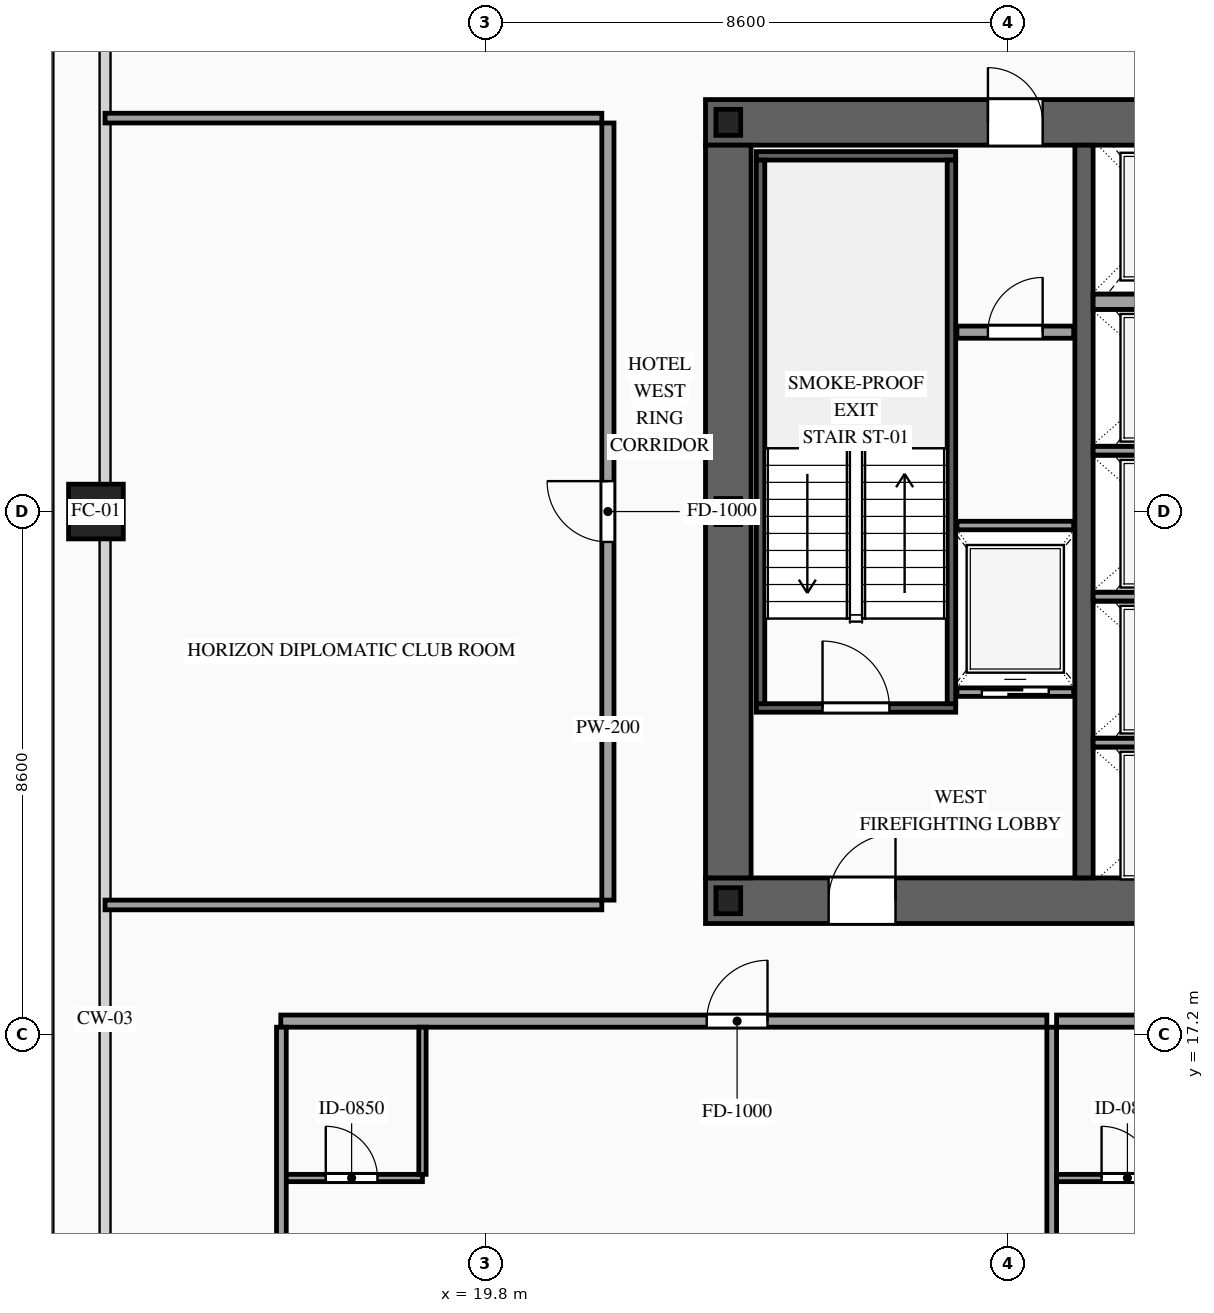
"""IFC4 building model, lengths in metres.
Left out: names, types, materials, properties, quantities, classifications, styles, units other than length and angle.
Written with IfcOpenShell. Run it as: python <this file> out.ifc"""

import sys

from ifc_helpers import new_model, si_unit, direction, frame, frame_2d, origin, origin_2d, place, context, subcontext, project, spatial, rectangle, hollow_rectangle, i_section, extrude, source, transform, mapped, element, fill, save


model = new_model("IFC4")
c1 = context("Model", 3, precision=1e-05, world=origin(), true_north=direction((0.0, 1.0)))
c2 = subcontext(c1, "Body", "Model", "MODEL_VIEW")
j1 = project(units=[si_unit("LENGTHUNIT", "METRE"), si_unit("PLANEANGLEUNIT", "RADIAN")], contexts=[c1])
p1 = place(None, origin())
s1 = spatial("IfcSite", under=j1, at=p1, CompositionType="ELEMENT")
p2 = place(p1, origin())
s2 = spatial("IfcBuilding", under=s1, at=p2, CompositionType="ELEMENT")
p3 = place(p2, frame((0.0, 0.0, 101.0)))
s3 = spatial("IfcBuildingStorey", under=s2, at=p3, CompositionType="ELEMENT", Elevation=101.0)
p4 = place(p3, frame((23.425, 19.4, 0.0), z_axis=(0.0, 0.0, 1.0), x_axis=(1.0, 0.0, 0.0)))
e1 = element("IfcWall", 1, at=p4, inside=s3, PredefinedType="SHEAR", context=c2, shape_type="SweptSolid", body=[
    extrude(rectangle(XDim=27.15, YDim=0.75, at=frame_2d((13.575, 0.0))), origin(), (0.0, 0.0, 1.0), 3.6),
])
p5 = place(p4, frame((2.025, 0.0, 0.0)))
e2 = element("IfcOpeningElement", 2, at=p5, cuts=e1, PredefinedType="OPENING", context=c2, shape_type="SweptSolid", body=[
    extrude(rectangle(XDim=1.1, YDim=2.2, at=frame_2d((0.55, 1.1))), frame((0.0, 0.39, 0.0), z_axis=(0.0, -1.0, 0.0), x_axis=(1.0, 0.0, 0.0)), (0.0, 0.0, 1.0), 0.78),
])
p6 = place(p4, frame((9.925, 0.0, 0.0)))
e3 = element("IfcOpeningElement", 3, at=p6, cuts=e1, PredefinedType="OPENING", context=c2, shape_type="SweptSolid", body=[
    extrude(rectangle(XDim=1.1, YDim=2.2, at=frame_2d((0.55, 1.1))), frame((0.0, 0.39, 0.0), z_axis=(0.0, -1.0, 0.0), x_axis=(1.0, 0.0, 0.0)), (0.0, 0.0, 1.0), 0.78),
])
p7 = place(p4, frame((23.125, 0.0, 0.0)))
e4 = element("IfcOpeningElement", 4, at=p7, cuts=e1, PredefinedType="OPENING", context=c2, shape_type="SweptSolid", body=[
    extrude(rectangle(XDim=1.1, YDim=2.2, at=frame_2d((0.55, 1.1))), frame((0.0, 0.39, 0.0), z_axis=(0.0, -1.0, 0.0), x_axis=(1.0, 0.0, 0.0)), (0.0, 0.0, 1.0), 0.78),
])
p8 = place(p4, frame((19.745, 0.0, 0.0)))
e5 = element("IfcOpeningElement", 5, at=p8, cuts=e1, PredefinedType="OPENING", context=c2, shape_type="SweptSolid", body=[
    extrude(rectangle(XDim=0.9, YDim=2.15, at=frame_2d((0.45, 1.075))), frame((0.0, 0.39, 0.0), z_axis=(0.0, -1.0, 0.0), x_axis=(1.0, 0.0, 0.0)), (0.0, 0.0, 1.0), 0.78),
])
p9 = place(p4, frame((18.305, 0.0, 0.0)))
e6 = element("IfcOpeningElement", 6, at=p9, cuts=e1, PredefinedType="OPENING", context=c2, shape_type="SweptSolid", body=[
    extrude(rectangle(XDim=0.9, YDim=2.15, at=frame_2d((0.45, 1.075))), frame((0.0, 0.39, 0.0), z_axis=(0.0, -1.0, 0.0), x_axis=(1.0, 0.0, 0.0)), (0.0, 0.0, 1.0), 0.78),
])
p10 = place(p3, frame((23.425, 32.2, 0.0), z_axis=(0.0, 0.0, 1.0), x_axis=(1.0, 0.0, 0.0)))
e7 = element("IfcWall", 7, at=p10, inside=s3, PredefinedType="SHEAR", context=c2, shape_type="SweptSolid", body=[
    extrude(rectangle(XDim=27.15, YDim=0.75, at=frame_2d((13.575, 0.0))), origin(), (0.0, 0.0, 1.0), 3.6),
])
p11 = place(p10, frame((4.645, 0.0, 0.0)))
e8 = element("IfcOpeningElement", 8, at=p11, cuts=e7, PredefinedType="OPENING", context=c2, shape_type="SweptSolid", body=[
    extrude(rectangle(XDim=0.9, YDim=2.15, at=frame_2d((0.45, 1.075))), frame((0.0, 0.39, 0.0), z_axis=(0.0, -1.0, 0.0), x_axis=(1.0, 0.0, 0.0)), (0.0, 0.0, 1.0), 0.78),
])
p12 = place(p10, frame((9.925, 0.0, 0.0)))
e9 = element("IfcOpeningElement", 9, at=p12, cuts=e7, PredefinedType="OPENING", context=c2, shape_type="SweptSolid", body=[
    extrude(rectangle(XDim=1.1, YDim=2.2, at=frame_2d((0.55, 1.1))), frame((0.0, 0.39, 0.0), z_axis=(0.0, -1.0, 0.0), x_axis=(1.0, 0.0, 0.0)), (0.0, 0.0, 1.0), 0.78),
])
p13 = place(p10, frame((15.775, 0.0, 0.0)))
e10 = element("IfcOpeningElement", 10, at=p13, cuts=e7, PredefinedType="OPENING", context=c2, shape_type="SweptSolid", body=[
    extrude(rectangle(XDim=1.1, YDim=2.2, at=frame_2d((0.55, 1.1))), frame((0.0, 0.39, 0.0), z_axis=(0.0, -1.0, 0.0), x_axis=(1.0, 0.0, 0.0)), (0.0, 0.0, 1.0), 0.78),
])
p14 = place(p10, frame((19.745, 0.0, 0.0)))
e11 = element("IfcOpeningElement", 11, at=p14, cuts=e7, PredefinedType="OPENING", context=c2, shape_type="SweptSolid", body=[
    extrude(rectangle(XDim=0.9, YDim=2.15, at=frame_2d((0.45, 1.075))), frame((0.0, 0.39, 0.0), z_axis=(0.0, -1.0, 0.0), x_axis=(1.0, 0.0, 0.0)), (0.0, 0.0, 1.0), 0.78),
])
m1 = source(origin(), c2, "Body", "SweptSolid", [
    extrude(rectangle(XDim=12.05, YDim=0.75, at=frame_2d((6.025, 0.0))), origin(), (0.0, 0.0, 1.0), 3.6),
])
p15 = place(p3, frame((23.8, 19.775, 0.0), z_axis=(0.0, 0.0, 1.0), x_axis=(0.0, 1.0, 0.0)))
e12 = element("IfcWall", 12, at=p15, inside=s3, PredefinedType="SHEAR", context=c2, shape_type="MappedRepresentation", body=[
    mapped(m1, transform((0.0, 0.0, 0.0), scale=1.0)),
])
m2 = source(origin(), c2, "Body", "SweptSolid", [
    extrude(rectangle(XDim=12.05, YDim=0.3, at=frame_2d((6.025, 0.0))), origin(), (0.0, 0.0, 1.0), 3.6),
])
p16 = place(p3, frame((29.65, 19.775, 0.0), z_axis=(0.0, 0.0, 1.0), x_axis=(0.0, 1.0, 0.0)))
e13 = element("IfcWall", 13, at=p16, inside=s3, PredefinedType="SOLIDWALL", context=c2, shape_type="MappedRepresentation", body=[
    mapped(m2, transform((0.0, 0.0, 0.0), scale=1.0)),
])
m3 = source(origin(), c2, "Body", "SweptSolid", [
    extrude(i_section(OverallWidth=0.407, OverallDepth=0.428, WebThickness=0.02, FlangeThickness=0.035, at=origin_2d()), origin(), (0.0, 0.0, 1.0), 3.6),
])
for number, where, z_axis, x_axis in (
    (14, (23.8, 19.4, 0.0), (0.0, 0.0, 1.0), (1.0, 0.0, 0.0)),
    (15, (23.8, 25.8, 0.0), (0.0, 0.0, 1.0), (1.0, 0.0, 0.0)),
    (16, (23.8, 32.2, 0.0), (0.0, 0.0, 1.0), (1.0, 0.0, 0.0)),
):
    element("IfcColumn", number, at=place(p3, frame(where, z_axis=z_axis, x_axis=x_axis)), inside=s3, PredefinedType="COLUMN", context=c2, shape_type="MappedRepresentation", body=[
        mapped(m3, transform((0.0, 0.0, 0.0), scale=1.0)),
    ])
m4 = source(origin(), c2, "Body", "SweptSolid", [
    extrude(hollow_rectangle(XDim=0.9, YDim=0.9, WallThickness=0.042, at=origin_2d()), origin(), (0.0, 0.0, 1.0), 3.6),
])
p17 = place(p3, frame((13.4, 25.8, 0.0), z_axis=(0.0, 0.0, 1.0), x_axis=(1.0, 0.0, 0.0)))
e17 = element("IfcColumn", 17, at=p17, inside=s3, PredefinedType="COLUMN", context=c2, shape_type="MappedRepresentation", body=[
    mapped(m4, transform((0.0, 0.0, 0.0), scale=1.0)),
])
p18 = place(p3, frame((27.56, 22.83, 0.0), z_axis=(0.0, 0.0, 1.0), x_axis=(1.0, 0.0, 0.0)))
e18 = element("IfcWall", 18, at=p18, inside=s3, PredefinedType="SOLIDWALL", context=c2, shape_type="SweptSolid", body=[
    extrude(rectangle(XDim=1.92, YDim=0.14, at=frame_2d((0.96, 0.0))), origin(), (0.0, 0.0, 1.0), 3.38),
])
p19 = place(p18, frame((0.41, 0.0, 0.0)))
e19 = element("IfcOpeningElement", 19, at=p19, cuts=e18, PredefinedType="OPENING", context=c2, shape_type="SweptSolid", body=[
    extrude(rectangle(XDim=1.1, YDim=2.2, at=frame_2d((0.55, 1.1))), frame((0.0, 0.085, 0.0), z_axis=(0.0, -1.0, 0.0), x_axis=(1.0, 0.0, 0.0)), (0.0, 0.0, 1.0), 0.17),
])
m5 = source(origin(), c2, "Body", "SweptSolid", [
    extrude(rectangle(XDim=1.92, YDim=0.14, at=frame_2d((0.96, 0.0))), origin(), (0.0, 0.0, 1.0), 3.38),
])
p20 = place(p3, frame((27.56, 25.57, 0.0), z_axis=(0.0, 0.0, 1.0), x_axis=(1.0, 0.0, 0.0)))
e20 = element("IfcWall", 20, at=p20, inside=s3, PredefinedType="SOLIDWALL", context=c2, shape_type="MappedRepresentation", body=[
    mapped(m5, transform((0.0, 0.0, 0.0), scale=1.0)),
])
m6 = source(origin(), c2, "Body", "SweptSolid", [
    extrude(rectangle(XDim=2.5, YDim=0.14, at=frame_2d((1.25, 0.0))), origin(), (0.0, 0.0, 1.0), 3.38),
])
for number, where, z_axis, x_axis in (
    (21, (29.8, 22.0, 0.0), (0.0, 0.0, 1.0), (1.0, 0.0, 0.0)),
    (22, (29.8, 24.4, 0.0), (0.0, 0.0, 1.0), (1.0, 0.0, 0.0)),
    (23, (29.8, 26.8, 0.0), (0.0, 0.0, 1.0), (1.0, 0.0, 0.0)),
):
    element("IfcWall", number, at=place(p3, frame(where, z_axis=z_axis, x_axis=x_axis)), inside=s3, PredefinedType="SOLIDWALL", context=c2, shape_type="MappedRepresentation", body=[
        mapped(m6, transform((0.0, 0.0, 0.0), scale=1.0)),
    ])
m7 = source(origin(), c2, "Body", "SweptSolid", [
    extrude(rectangle(XDim=2.5, YDim=0.25, at=frame_2d((1.25, 0.0))), origin(), (0.0, 0.0, 1.0), 3.38),
])
p21 = place(p3, frame((29.8, 29.25, 0.0), z_axis=(0.0, 0.0, 1.0), x_axis=(1.0, 0.0, 0.0)))
e24 = element("IfcWall", 24, at=p21, inside=s3, PredefinedType="SOLIDWALL", context=c2, shape_type="MappedRepresentation", body=[
    mapped(m7, transform((0.0, 0.0, 0.0), scale=1.0)),
])
p22 = place(p3, frame((24.26, 22.57, 0.0), z_axis=(0.0, 0.0, 1.0), x_axis=(1.0, 0.0, 0.0)))
e25 = element("IfcWall", 25, at=p22, inside=s3, PredefinedType="SOLIDWALL", context=c2, shape_type="SweptSolid", body=[
    extrude(rectangle(XDim=3.28, YDim=0.14, at=frame_2d((1.64, 0.0))), origin(), (0.0, 0.0, 1.0), 3.38),
])
p23 = place(p22, frame((1.09, 0.0, 0.0)))
e26 = element("IfcOpeningElement", 26, at=p23, cuts=e25, PredefinedType="OPENING", context=c2, shape_type="SweptSolid", body=[
    extrude(rectangle(XDim=1.1, YDim=2.2, at=frame_2d((0.55, 1.1))), frame((0.0, 0.085, 0.0), z_axis=(0.0, -1.0, 0.0), x_axis=(1.0, 0.0, 0.0)), (0.0, 0.0, 1.0), 0.17),
])
m8 = source(origin(), c2, "Body", "SweptSolid", [
    extrude(rectangle(XDim=3.28, YDim=0.14, at=frame_2d((1.64, 0.0))), origin(), (0.0, 0.0, 1.0), 3.38),
])
p24 = place(p3, frame((24.26, 31.65, 0.0), z_axis=(0.0, 0.0, 1.0), x_axis=(1.0, 0.0, 0.0)))
e27 = element("IfcWall", 27, at=p24, inside=s3, PredefinedType="SOLIDWALL", context=c2, shape_type="MappedRepresentation", body=[
    mapped(m8, transform((0.0, 0.0, 0.0), scale=1.0)),
])
m9 = source(origin(), c2, "Body", "SweptSolid", [
    extrude(rectangle(XDim=8.94, YDim=0.14, at=frame_2d((4.47, 0.0))), origin(), (0.0, 0.0, 1.0), 3.38),
])
for number, where, z_axis, x_axis in (
    (28, (24.33, 22.64, 0.0), (0.0, 0.0, 1.0), (0.0, 1.0, 0.0)),
    (29, (27.47, 22.64, 0.0), (0.0, 0.0, 1.0), (0.0, 1.0, 0.0)),
):
    element("IfcWall", number, at=place(p3, frame(where, z_axis=z_axis, x_axis=x_axis)), inside=s3, PredefinedType="SOLIDWALL", context=c2, shape_type="MappedRepresentation", body=[
        mapped(m9, transform((0.0, 0.0, 0.0), scale=1.0)),
    ])
p25 = place(p3, frame((27.56, 28.75, 0.0), z_axis=(0.0, 0.0, 1.0), x_axis=(1.0, 0.0, 0.0)))
e30 = element("IfcWall", 30, at=p25, inside=s3, PredefinedType="PARTITIONING", context=c2, shape_type="SweptSolid", body=[
    extrude(rectangle(XDim=1.92, YDim=0.2, at=frame_2d((0.96, 0.0))), origin(), (0.0, 0.0, 1.0), 3.38),
])
p26 = place(p25, frame((0.51, 0.0, 0.0)))
e31 = element("IfcOpeningElement", 31, at=p26, cuts=e30, PredefinedType="OPENING", context=c2, shape_type="SweptSolid", body=[
    extrude(rectangle(XDim=0.9, YDim=2.15, at=frame_2d((0.45, 1.075))), frame((0.0, 0.115, 0.0), z_axis=(0.0, -1.0, 0.0), x_axis=(1.0, 0.0, 0.0)), (0.0, 0.0, 1.0), 0.23),
])
p27 = place(p3, frame((16.44, 17.42, 0.0), z_axis=(0.0, 0.0, 1.0), x_axis=(1.0, 0.0, 0.0)))
e32 = element("IfcWall", 32, at=p27, inside=s3, PredefinedType="PARTITIONING", context=c2, shape_type="SweptSolid", body=[
    extrude(rectangle(XDim=12.599, YDim=0.2, at=frame_2d((6.3, 0.0))), origin(), (0.0, 0.0, 1.0), 3.38),
])
p28 = place(p27, frame((7.005, 0.0, 0.0)))
e33 = element("IfcOpeningElement", 33, at=p28, cuts=e32, PredefinedType="OPENING", context=c2, shape_type="SweptSolid", body=[
    extrude(rectangle(XDim=1.0, YDim=2.2, at=frame_2d((0.5, 1.1))), frame((0.0, 0.115, 0.0), z_axis=(0.0, -1.0, 0.0), x_axis=(1.0, 0.0, 0.0)), (0.0, 0.0, 1.0), 0.23),
])
m10 = source(origin(), c2, "Body", "SweptSolid", [
    extrude(rectangle(XDim=14.97, YDim=0.16, at=frame_2d((7.485, 0.0))), origin(), (0.0, 0.0, 1.0), 3.38),
])
p29 = place(p3, frame((29.119, 2.35, 0.0), z_axis=(0.0, 0.0, 1.0), x_axis=(0.0, 1.0, 0.0)))
e34 = element("IfcWall", 34, at=p29, inside=s3, PredefinedType="PARTITIONING", context=c2, shape_type="MappedRepresentation", body=[
    mapped(m10, transform((0.0, 0.0, 0.0), scale=1.0)),
])
p30 = place(p3, frame((16.44, 14.84, 0.0), z_axis=(0.0, 0.0, 1.0), x_axis=(1.0, 0.0, 0.0)))
e35 = element("IfcWall", 35, at=p30, inside=s3, PredefinedType="PARTITIONING", context=c2, shape_type="SweptSolid", body=[
    extrude(rectangle(XDim=2.33, YDim=0.12, at=frame_2d((1.165, 0.0))), origin(), (0.0, 0.0, 1.0), 3.38),
])
p31 = place(p30, frame((0.74, 0.0, 0.0)))
e36 = element("IfcOpeningElement", 36, at=p31, cuts=e35, PredefinedType="OPENING", context=c2, shape_type="SweptSolid", body=[
    extrude(rectangle(XDim=0.85, YDim=2.1, at=frame_2d((0.425, 1.05))), frame((0.0, 0.075, 0.0), z_axis=(0.0, -1.0, 0.0), x_axis=(1.0, 0.0, 0.0)), (0.0, 0.0, 1.0), 0.15),
])
m11 = source(origin(), c2, "Body", "SweptSolid", [
    extrude(rectangle(XDim=2.42, YDim=0.12, at=frame_2d((1.21, 0.0))), origin(), (0.0, 0.0, 1.0), 3.38),
])
p32 = place(p3, frame((18.77, 14.9, 0.0), z_axis=(0.0, 0.0, 1.0), x_axis=(0.0, 1.0, 0.0)))
e37 = element("IfcWall", 37, at=p32, inside=s3, PredefinedType="PARTITIONING", context=c2, shape_type="MappedRepresentation", body=[
    mapped(m11, transform((0.0, 0.0, 0.0), scale=1.0)),
])
p33 = place(p3, frame((29.199, 17.42, 0.0), z_axis=(0.0, 0.0, 1.0), x_axis=(1.0, 0.0, 0.0)))
e38 = element("IfcWall", 38, at=p33, inside=s3, PredefinedType="PARTITIONING", context=c2, shape_type="SweptSolid", body=[
    extrude(rectangle(XDim=15.191, YDim=0.2, at=frame_2d((7.595, 0.0))), origin(), (0.0, 0.0, 1.0), 3.38),
])
p34 = place(p33, frame((8.3, 0.0, 0.0)))
e39 = element("IfcOpeningElement", 39, at=p34, cuts=e38, PredefinedType="OPENING", context=c2, shape_type="SweptSolid", body=[
    extrude(rectangle(XDim=1.0, YDim=2.2, at=frame_2d((0.5, 1.1))), frame((0.0, 0.115, 0.0), z_axis=(0.0, -1.0, 0.0), x_axis=(1.0, 0.0, 0.0)), (0.0, 0.0, 1.0), 0.23),
])
p35 = place(p3, frame((29.199, 14.84, 0.0), z_axis=(0.0, 0.0, 1.0), x_axis=(1.0, 0.0, 0.0)))
e40 = element("IfcWall", 40, at=p35, inside=s3, PredefinedType="PARTITIONING", context=c2, shape_type="SweptSolid", body=[
    extrude(rectangle(XDim=2.33, YDim=0.12, at=frame_2d((1.165, 0.0))), origin(), (0.0, 0.0, 1.0), 3.38),
])
p36 = place(p35, frame((0.74, 0.0, 0.0)))
e41 = element("IfcOpeningElement", 41, at=p36, cuts=e40, PredefinedType="OPENING", context=c2, shape_type="SweptSolid", body=[
    extrude(rectangle(XDim=0.85, YDim=2.1, at=frame_2d((0.425, 1.05))), frame((0.0, 0.075, 0.0), z_axis=(0.0, -1.0, 0.0), x_axis=(1.0, 0.0, 0.0)), (0.0, 0.0, 1.0), 0.15),
])
m12 = source(origin(), c2, "Body", "SweptSolid", [
    extrude(rectangle(XDim=14.82, YDim=0.16, at=frame_2d((7.41, 0.0))), origin(), (0.0, 0.0, 1.0), 3.38),
])
p37 = place(p3, frame((16.45, 2.5, 0.0), z_axis=(0.0, 0.0, 1.0), x_axis=(0.0, 1.0, 0.0)))
e42 = element("IfcWall", 42, at=p37, inside=s3, PredefinedType="PARTITIONING", context=c2, shape_type="MappedRepresentation", body=[
    mapped(m12, transform((0.0, 0.0, 0.0), scale=1.0)),
])
p38 = place(p3, frame((21.82, 19.41, 0.0), z_axis=(0.0, 0.0, 1.0), x_axis=(0.0, 1.0, 0.0)))
e43 = element("IfcWall", 43, at=p38, inside=s3, PredefinedType="PARTITIONING", context=c2, shape_type="SweptSolid", body=[
    extrude(rectangle(XDim=12.78, YDim=0.2, at=frame_2d((6.39, 0.0))), origin(), (0.0, 0.0, 1.0), 3.38),
])
p39 = place(p38, frame((5.89, 0.0, 0.0)))
e44 = element("IfcOpeningElement", 44, at=p39, cuts=e43, PredefinedType="OPENING", context=c2, shape_type="SweptSolid", body=[
    extrude(rectangle(XDim=1.0, YDim=2.2, at=frame_2d((0.5, 1.1))), frame((0.0, 0.115, 0.0), z_axis=(0.0, -1.0, 0.0), x_axis=(1.0, 0.0, 0.0)), (0.0, 0.0, 1.0), 0.23),
])
m13 = source(origin(), c2, "Body", "SweptSolid", [
    extrude(rectangle(XDim=8.17, YDim=0.16, at=frame_2d((4.085, 0.0))), origin(), (0.0, 0.0, 1.0), 2.875),
])
for number, where, z_axis, x_axis in (
    (45, (13.55, 19.33, 0.0), (0.0, 0.0, 1.0), (1.0, 0.0, 0.0)),
    (46, (13.55, 32.27, 0.0), (0.0, 0.0, 1.0), (1.0, 0.0, 0.0)),
):
    element("IfcWall", number, at=place(p3, frame(where, z_axis=z_axis, x_axis=x_axis)), inside=s3, PredefinedType="PARTITIONING", context=c2, shape_type="MappedRepresentation", body=[
        mapped(m13, transform((0.0, 0.0, 0.0), scale=1.0)),
    ])
m14 = source(origin(), c2, "Body", "SweptSolid", [
    extrude(rectangle(XDim=1.1, YDim=2.2, at=frame_2d((0.55, 1.1))), frame((0.0, 0.025, 0.0), z_axis=(0.0, -1.0, 0.0), x_axis=(1.0, 0.0, 0.0)), (0.0, 0.0, 1.0), 0.05),
])
p40 = place(p19, origin())
e47 = element("IfcDoor", 47, at=p40, inside=s3, OperationType="SLIDING_TO_LEFT", PredefinedType="DOOR", context=c2, shape_type="MappedRepresentation", body=[
    mapped(m14, transform((0.0, 0.0, 0.0), scale=1.0)),
])
fill(e19, e47)
m15 = source(origin(), c2, "Body", "SweptSolid", [
    extrude(rectangle(XDim=1.1, YDim=2.2, at=frame_2d((0.55, 1.1))), frame((0.0, 0.025, 0.0), z_axis=(0.0, -1.0, 0.0), x_axis=(1.0, 0.0, 0.0)), (0.0, 0.0, 1.0), 0.05),
])
p41 = place(p23, origin())
e48 = element("IfcDoor", 48, at=p41, inside=s3, OperationType="SINGLE_SWING_LEFT", PredefinedType="DOOR", context=c2, shape_type="MappedRepresentation", body=[
    mapped(m15, transform((0.0, 0.0, 0.0), scale=1.0)),
])
fill(e26, e48)
p42 = place(p5, origin())
e49 = element("IfcDoor", 49, at=p42, inside=s3, OperationType="SINGLE_SWING_RIGHT", PredefinedType="DOOR", context=c2, shape_type="MappedRepresentation", body=[
    mapped(m15, transform((0.0, 0.0, 0.0), scale=1.0)),
])
fill(e2, e49)
m16 = source(origin(), c2, "Body", "SweptSolid", [
    extrude(rectangle(XDim=0.9, YDim=2.15, at=frame_2d((0.45, 1.075))), frame((0.0, 0.025, 0.0), z_axis=(0.0, -1.0, 0.0), x_axis=(1.0, 0.0, 0.0)), (0.0, 0.0, 1.0), 0.05),
])
p43 = place(p11, origin())
e50 = element("IfcDoor", 50, at=p43, inside=s3, OperationType="SINGLE_SWING_LEFT", PredefinedType="DOOR", context=c2, shape_type="MappedRepresentation", body=[
    mapped(m16, transform((0.0, 0.0, 0.0), scale=1.0)),
])
fill(e8, e50)
p44 = place(p26, origin())
e51 = element("IfcDoor", 51, at=p44, inside=s3, OperationType="SINGLE_SWING_RIGHT", PredefinedType="DOOR", context=c2, shape_type="MappedRepresentation", body=[
    mapped(m16, transform((0.0, 0.0, 0.0), scale=1.0)),
])
fill(e31, e51)
m17 = source(origin(), c2, "Body", "SweptSolid", [
    extrude(rectangle(XDim=1.0, YDim=2.2, at=frame_2d((0.5, 1.1))), frame((0.0, 0.025, 0.0), z_axis=(0.0, -1.0, 0.0), x_axis=(1.0, 0.0, 0.0)), (0.0, 0.0, 1.0), 0.05),
])
p45 = place(p28, origin())
e52 = element("IfcDoor", 52, at=p45, inside=s3, OperationType="SINGLE_SWING_RIGHT", PredefinedType="DOOR", context=c2, shape_type="MappedRepresentation", body=[
    mapped(m17, transform((0.0, 0.0, 0.0), scale=1.0)),
])
fill(e33, e52)
m18 = source(origin(), c2, "Body", "SweptSolid", [
    extrude(rectangle(XDim=0.85, YDim=2.1, at=frame_2d((0.425, 1.05))), frame((0.0, 0.025, 0.0), z_axis=(0.0, -1.0, 0.0), x_axis=(1.0, 0.0, 0.0)), (0.0, 0.0, 1.0), 0.05),
])
p46 = place(p31, origin())
e53 = element("IfcDoor", 53, at=p46, inside=s3, OperationType="SINGLE_SWING_LEFT", PredefinedType="DOOR", context=c2, shape_type="MappedRepresentation", body=[
    mapped(m18, transform((0.0, 0.0, 0.0), scale=1.0)),
])
fill(e36, e53)
p47 = place(p36, origin())
e54 = element("IfcDoor", 54, at=p47, inside=s3, OperationType="SINGLE_SWING_LEFT", PredefinedType="DOOR", context=c2, shape_type="MappedRepresentation", body=[
    mapped(m18, transform((0.0, 0.0, 0.0), scale=1.0)),
])
fill(e41, e54)
p48 = place(p39, origin())
e55 = element("IfcDoor", 55, at=p48, inside=s3, OperationType="SINGLE_SWING_RIGHT", PredefinedType="DOOR", context=c2, shape_type="MappedRepresentation", body=[
    mapped(m17, transform((0.0, 0.0, 0.0), scale=1.0)),
])
fill(e44, e55)
save(model, sys.argv[1])
